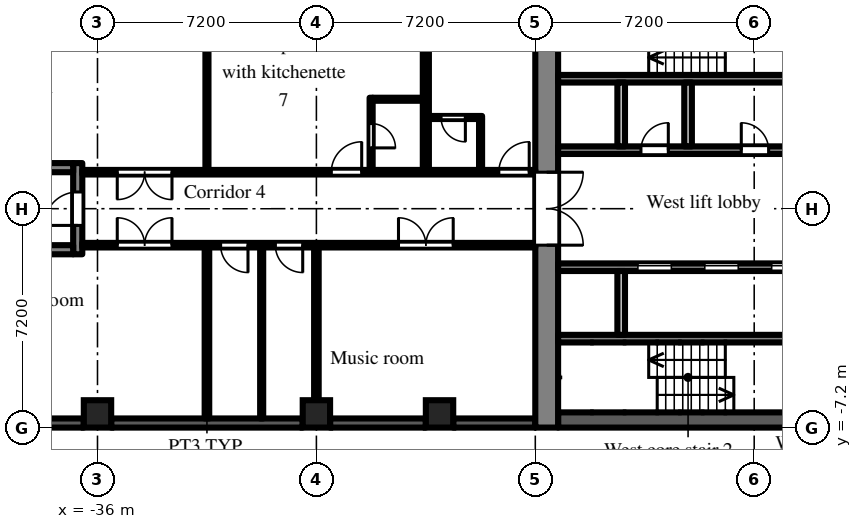
"""IFC4 building model, lengths in metres.
Left out: names, types, materials, properties, quantities, classifications, styles, units other than length and angle.
Written with IfcOpenShell. Run it as: python <this file> out.ifc"""

import sys

from ifc_helpers import new_model, si_unit, direction, frame, frame_2d, origin, origin_2d, place, context, subcontext, project, spatial, rectangle, extrude, element, fill, save


model = new_model("IFC4")
c1 = context("Model", 3, precision=1e-05, world=origin(), true_north=direction((0.0, 1.0)))
c2 = subcontext(c1, "Body", "Model", "MODEL_VIEW")
j1 = project(units=[si_unit("LENGTHUNIT", "METRE"), si_unit("PLANEANGLEUNIT", "RADIAN")], contexts=[c1])
p1 = place(None, origin())
s1 = spatial("IfcSite", under=j1, at=p1, CompositionType="ELEMENT")
p2 = place(p1, origin())
s2 = spatial("IfcBuilding", under=s1, at=p2, CompositionType="ELEMENT")
p3 = place(p2, frame((0.0, 0.0, 59.7)))
s3 = spatial("IfcBuildingStorey", under=s2, at=p3, CompositionType="ELEMENT", Elevation=59.7)
for number, where, z_axis, x_axis in (
    (1, (-36.0, -6.75, 0.0), (0.0, 0.0, 1.0), (1.0, 0.0, 0.0)),
    (2, (-28.8, -6.75, 0.0), (0.0, 0.0, 1.0), (1.0, 0.0, 0.0)),
    (3, (-24.75, -6.75, 0.0), (0.0, 0.0, 1.0), (1.0, 0.0, 0.0)),
):
    element("IfcColumn", number, at=place(p3, frame(where, z_axis=z_axis, x_axis=x_axis)), inside=s3, PredefinedType="COLUMN", context=c2, shape_type="SweptSolid", body=[
        extrude(rectangle(XDim=0.9, YDim=0.9, at=origin_2d()), origin(), (0.0, 0.0, 1.0), 3.0),
    ])
p4 = place(p3, frame((-38.7, -7.05, 0.0), z_axis=(0.0, 0.0, 1.0), x_axis=(1.0, 0.0, 0.0)))
e4 = element("IfcWall", 4, at=p4, inside=s3, PredefinedType="SOLIDWALL", context=c2, shape_type="SweptSolid", body=[
    extrude(rectangle(XDim=2.25, YDim=0.3, at=frame_2d((1.125, 0.0))), origin(), (0.0, 0.0, 1.0), 2.1),
])
p5 = place(p3, frame((-35.55, -7.05, 0.0), z_axis=(0.0, 0.0, 1.0), x_axis=(1.0, 0.0, 0.0)))
e5 = element("IfcWall", 5, at=p5, inside=s3, PredefinedType="SOLIDWALL", context=c2, shape_type="SweptSolid", body=[
    extrude(rectangle(XDim=6.3, YDim=0.3, at=frame_2d((3.15, 0.0))), origin(), (0.0, 0.0, 1.0), 2.1),
])
p6 = place(p3, frame((-28.35, -7.05, 0.0), z_axis=(0.0, 0.0, 1.0), x_axis=(1.0, 0.0, 0.0)))
e6 = element("IfcWall", 6, at=p6, inside=s3, PredefinedType="SOLIDWALL", context=c2, shape_type="SweptSolid", body=[
    extrude(rectangle(XDim=3.15, YDim=0.3, at=frame_2d((1.575, 0.0))), origin(), (0.0, 0.0, 1.0), 2.1),
])
p7 = place(p3, frame((-24.3, -7.05, 0.0), z_axis=(0.0, 0.0, 1.0), x_axis=(1.0, 0.0, 0.0)))
e7 = element("IfcWall", 7, at=p7, inside=s3, PredefinedType="SOLIDWALL", context=c2, shape_type="SweptSolid", body=[
    extrude(rectangle(XDim=2.7, YDim=0.3, at=frame_2d((1.35, 0.0))), origin(), (0.0, 0.0, 1.0), 2.1),
])
p8 = place(p3, frame((-21.225, -7.2, 0.0), z_axis=(0.0, 0.0, 1.0), x_axis=(0.0, 1.0, 0.0)))
e8 = element("IfcWall", 8, at=p8, inside=s3, PredefinedType="SHEAR", context=c2, shape_type="SweptSolid", body=[
    extrude(rectangle(XDim=14.4, YDim=0.75, at=frame_2d((7.2, 0.0))), origin(), (0.0, 0.0, 1.0), 2.55),
])
p9 = place(p8, frame((6.0, 0.0, 0.0)))
e9 = element("IfcOpeningElement", 9, at=p9, cuts=e8, PredefinedType="OPENING", context=c2, shape_type="SweptSolid", body=[
    extrude(rectangle(XDim=2.4, YDim=2.2, at=frame_2d((1.2, 1.1))), frame((0.0, 0.385, 0.0), z_axis=(0.0, -1.0, 0.0), x_axis=(1.0, 0.0, 0.0)), (0.0, 0.0, 1.0), 0.77),
])
p10 = place(p3, frame((-7.9, 1.925, 0.0), z_axis=(0.0, 0.0, 1.0), x_axis=(-1.0, 0.0, 0.0)))
e10 = element("IfcWall", 10, at=p10, inside=s3, PredefinedType="SHEAR", context=c2, shape_type="SweptSolid", body=[
    extrude(rectangle(XDim=12.95, YDim=0.25, at=frame_2d((6.475, 0.0))), origin(), (0.0, 0.0, 1.0), 2.55),
])
p11 = place(p10, frame((0.525, 0.0, 0.0)))
e11 = element("IfcOpeningElement", 11, at=p11, cuts=e10, PredefinedType="OPENING", context=c2, shape_type="SweptSolid", body=[
    extrude(rectangle(XDim=0.9, YDim=2.1, at=frame_2d((0.45, 1.05))), frame((0.0, 0.135, 0.0), z_axis=(0.0, -1.0, 0.0), x_axis=(1.0, 0.0, 0.0)), (0.0, 0.0, 1.0), 0.27),
])
p12 = place(p10, frame((2.625, 0.0, 0.0)))
e12 = element("IfcOpeningElement", 12, at=p12, cuts=e10, PredefinedType="OPENING", context=c2, shape_type="SweptSolid", body=[
    extrude(rectangle(XDim=1.1, YDim=2.1, at=frame_2d((0.55, 1.05))), frame((0.0, 0.135, 0.0), z_axis=(0.0, -1.0, 0.0), x_axis=(1.0, 0.0, 0.0)), (0.0, 0.0, 1.0), 0.27),
])
p13 = place(p10, frame((6.025, 0.0, 0.0)))
e13 = element("IfcOpeningElement", 13, at=p13, cuts=e10, PredefinedType="OPENING", context=c2, shape_type="SweptSolid", body=[
    extrude(rectangle(XDim=0.9, YDim=2.1, at=frame_2d((0.45, 1.05))), frame((0.0, 0.135, 0.0), z_axis=(0.0, -1.0, 0.0), x_axis=(1.0, 0.0, 0.0)), (0.0, 0.0, 1.0), 0.27),
])
p14 = place(p10, frame((9.325, 0.0, 0.0)))
e14 = element("IfcOpeningElement", 14, at=p14, cuts=e10, PredefinedType="OPENING", context=c2, shape_type="SweptSolid", body=[
    extrude(rectangle(XDim=0.9, YDim=2.1, at=frame_2d((0.45, 1.05))), frame((0.0, 0.135, 0.0), z_axis=(0.0, -1.0, 0.0), x_axis=(1.0, 0.0, 0.0)), (0.0, 0.0, 1.0), 0.27),
])
p15 = place(p3, frame((-12.3, 4.275, 0.0), z_axis=(0.0, 0.0, 1.0), x_axis=(-1.0, 0.0, 0.0)))
e15 = element("IfcWall", 15, at=p15, inside=s3, PredefinedType="SHEAR", context=c2, shape_type="SweptSolid", body=[
    extrude(rectangle(XDim=8.55, YDim=0.25, at=frame_2d((4.275, 0.0))), origin(), (0.0, 0.0, 1.0), 2.55),
])
for number, where, z_axis, x_axis in (
    (16, (-16.575, 2.05, 0.0), (0.0, 0.0, 1.0), (0.0, 1.0, 0.0)),
    (17, (-18.775, 2.05, 0.0), (0.0, 0.0, 1.0), (0.0, 1.0, 0.0)),
):
    element("IfcWall", number, at=place(p3, frame(where, z_axis=z_axis, x_axis=x_axis)), inside=s3, PredefinedType="PARTITIONING", context=c2, shape_type="SweptSolid", body=[
        extrude(rectangle(XDim=2.1, YDim=0.25, at=frame_2d((1.05, 0.0))), origin(), (0.0, 0.0, 1.0), 2.55),
    ])
p16 = place(p3, frame((-7.9, -6.95, 0.0), z_axis=(0.0, 0.0, 1.0), x_axis=(-1.0, 0.0, 0.0)))
e18 = element("IfcWall", 18, at=p16, inside=s3, PredefinedType="SHEAR", context=c2, shape_type="SweptSolid", body=[
    extrude(rectangle(XDim=12.95, YDim=0.5, at=frame_2d((6.475, 0.0))), origin(), (0.0, 0.0, 1.0), 2.55),
])
p17 = place(p3, frame((-7.9, -1.925, 0.0), z_axis=(0.0, 0.0, 1.0), x_axis=(-1.0, 0.0, 0.0)))
e19 = element("IfcWall", 19, at=p17, inside=s3, PredefinedType="SHEAR", context=c2, shape_type="SweptSolid", body=[
    extrude(rectangle(XDim=12.95, YDim=0.25, at=frame_2d((6.475, 0.0))), origin(), (0.0, 0.0, 1.0), 2.55),
])
p18 = place(p17, frame((4.825, 0.0, 0.0)))
e20 = element("IfcOpeningElement", 20, at=p18, cuts=e19, PredefinedType="OPENING", context=c2, shape_type="SweptSolid", body=[
    extrude(rectangle(XDim=1.1, YDim=2.1, at=frame_2d((0.55, 1.05))), frame((0.0, 0.135, 0.0), z_axis=(0.0, -1.0, 0.0), x_axis=(1.0, 0.0, 0.0)), (0.0, 0.0, 1.0), 0.27),
])
p19 = place(p17, frame((7.025, 0.0, 0.0)))
e21 = element("IfcOpeningElement", 21, at=p19, cuts=e19, PredefinedType="OPENING", context=c2, shape_type="SweptSolid", body=[
    extrude(rectangle(XDim=1.1, YDim=2.1, at=frame_2d((0.55, 1.05))), frame((0.0, 0.135, 0.0), z_axis=(0.0, -1.0, 0.0), x_axis=(1.0, 0.0, 0.0)), (0.0, 0.0, 1.0), 0.27),
])
p20 = place(p17, frame((9.225, 0.0, 0.0)))
e22 = element("IfcOpeningElement", 22, at=p20, cuts=e19, PredefinedType="OPENING", context=c2, shape_type="SweptSolid", body=[
    extrude(rectangle(XDim=1.1, YDim=2.1, at=frame_2d((0.55, 1.05))), frame((0.0, 0.135, 0.0), z_axis=(0.0, -1.0, 0.0), x_axis=(1.0, 0.0, 0.0)), (0.0, 0.0, 1.0), 0.27),
])
p21 = place(p17, frame((0.525, 0.0, 0.0)))
e23 = element("IfcOpeningElement", 23, at=p21, cuts=e19, PredefinedType="OPENING", context=c2, shape_type="SweptSolid", body=[
    extrude(rectangle(XDim=0.9, YDim=2.1, at=frame_2d((0.45, 1.05))), frame((0.0, 0.135, 0.0), z_axis=(0.0, -1.0, 0.0), x_axis=(1.0, 0.0, 0.0)), (0.0, 0.0, 1.0), 0.27),
])
p22 = place(p17, frame((2.625, 0.0, 0.0)))
e24 = element("IfcOpeningElement", 24, at=p22, cuts=e19, PredefinedType="OPENING", context=c2, shape_type="SweptSolid", body=[
    extrude(rectangle(XDim=1.1, YDim=2.1, at=frame_2d((0.55, 1.05))), frame((0.0, 0.135, 0.0), z_axis=(0.0, -1.0, 0.0), x_axis=(1.0, 0.0, 0.0)), (0.0, 0.0, 1.0), 0.27),
])
p23 = place(p3, frame((-12.3, -4.275, 0.0), z_axis=(0.0, 0.0, 1.0), x_axis=(-1.0, 0.0, 0.0)))
e25 = element("IfcWall", 25, at=p23, inside=s3, PredefinedType="SHEAR", context=c2, shape_type="SweptSolid", body=[
    extrude(rectangle(XDim=8.55, YDim=0.25, at=frame_2d((4.275, 0.0))), origin(), (0.0, 0.0, 1.0), 2.55),
])
p24 = place(p3, frame((-18.775, -2.05, 0.0), z_axis=(0.0, 0.0, 1.0), x_axis=(0.0, -1.0, 0.0)))
e26 = element("IfcWall", 26, at=p24, inside=s3, PredefinedType="PARTITIONING", context=c2, shape_type="SweptSolid", body=[
    extrude(rectangle(XDim=2.1, YDim=0.25, at=frame_2d((1.05, 0.0))), origin(), (0.0, 0.0, 1.0), 2.55),
])
p25 = place(p3, frame((-36.65, -1.5, 0.0), z_axis=(0.0, 0.0, 1.0), x_axis=(0.0, 1.0, 0.0)))
e27 = element("IfcWall", 27, at=p25, inside=s3, PredefinedType="SHEAR", context=c2, shape_type="SweptSolid", body=[
    extrude(rectangle(XDim=3.0, YDim=0.3, at=frame_2d((1.5, 0.0))), origin(), (0.0, 0.0, 1.0), 2.55),
])
p26 = place(p25, frame((0.95, 0.0, 0.0)))
e28 = element("IfcOpeningElement", 28, at=p26, cuts=e27, PredefinedType="OPENING", context=c2, shape_type="SweptSolid", body=[
    extrude(rectangle(XDim=1.1, YDim=2.1, at=frame_2d((0.55, 1.05))), frame((0.0, 0.16, 0.0), z_axis=(0.0, -1.0, 0.0), x_axis=(1.0, 0.0, 0.0)), (0.0, 0.0, 1.0), 0.32),
])
for number, where, z_axis, x_axis in (
    (29, (-36.8, -1.35, 0.0), (0.0, 0.0, 1.0), (-1.0, 0.0, 0.0)),
    (30, (-36.8, 1.35, 0.0), (0.0, 0.0, 1.0), (-1.0, 0.0, 0.0)),
):
    element("IfcWall", number, at=place(p3, frame(where, z_axis=z_axis, x_axis=x_axis)), inside=s3, PredefinedType="SHEAR", context=c2, shape_type="SweptSolid", body=[
        extrude(rectangle(XDim=5.8, YDim=0.3, at=frame_2d((2.9, 0.0))), origin(), (0.0, 0.0, 1.0), 2.55),
    ])
p27 = place(p3, frame((-36.5, -1.2, 0.0), z_axis=(0.0, 0.0, 1.0), x_axis=(1.0, 0.0, 0.0)))
e31 = element("IfcWall", 31, at=p27, inside=s3, PredefinedType="PARTITIONING", context=c2, shape_type="SweptSolid", body=[
    extrude(rectangle(XDim=14.9, YDim=0.15, at=frame_2d((7.45, 0.0))), origin(), (0.0, 0.0, 1.0), 2.55),
])
p28 = place(p27, frame((10.4, 0.0, 0.0)))
e32 = element("IfcOpeningElement", 32, at=p28, cuts=e31, PredefinedType="OPENING", context=c2, shape_type="SweptSolid", body=[
    extrude(rectangle(XDim=1.8, YDim=2.1, at=frame_2d((0.9, 1.05))), frame((0.0, 0.085, 0.0), z_axis=(0.0, -1.0, 0.0), x_axis=(1.0, 0.0, 0.0)), (0.0, 0.0, 1.0), 0.17),
])
p29 = place(p27, frame((6.35, 0.0, 0.0)))
e33 = element("IfcOpeningElement", 33, at=p29, cuts=e31, PredefinedType="OPENING", context=c2, shape_type="SweptSolid", body=[
    extrude(rectangle(XDim=0.9, YDim=2.1, at=frame_2d((0.45, 1.05))), frame((0.0, 0.085, 0.0), z_axis=(0.0, -1.0, 0.0), x_axis=(1.0, 0.0, 0.0)), (0.0, 0.0, 1.0), 0.17),
])
p30 = place(p27, frame((4.55, 0.0, 0.0)))
e34 = element("IfcOpeningElement", 34, at=p30, cuts=e31, PredefinedType="OPENING", context=c2, shape_type="SweptSolid", body=[
    extrude(rectangle(XDim=0.9, YDim=2.1, at=frame_2d((0.45, 1.05))), frame((0.0, 0.085, 0.0), z_axis=(0.0, -1.0, 0.0), x_axis=(1.0, 0.0, 0.0)), (0.0, 0.0, 1.0), 0.17),
])
p31 = place(p27, frame((1.15, 0.0, 0.0)))
e35 = element("IfcOpeningElement", 35, at=p31, cuts=e31, PredefinedType="OPENING", context=c2, shape_type="SweptSolid", body=[
    extrude(rectangle(XDim=1.8, YDim=2.1, at=frame_2d((0.9, 1.05))), frame((0.0, 0.085, 0.0), z_axis=(0.0, -1.0, 0.0), x_axis=(1.0, 0.0, 0.0)), (0.0, 0.0, 1.0), 0.17),
])
p32 = place(p3, frame((-36.5, 1.2, 0.0), z_axis=(0.0, 0.0, 1.0), x_axis=(1.0, 0.0, 0.0)))
e36 = element("IfcWall", 36, at=p32, inside=s3, PredefinedType="PARTITIONING", context=c2, shape_type="SweptSolid", body=[
    extrude(rectangle(XDim=14.9, YDim=0.15, at=frame_2d((7.45, 0.0))), origin(), (0.0, 0.0, 1.0), 2.55),
])
p33 = place(p32, frame((13.7, 0.0, 0.0)))
e37 = element("IfcOpeningElement", 37, at=p33, cuts=e36, PredefinedType="OPENING", context=c2, shape_type="SweptSolid", body=[
    extrude(rectangle(XDim=1.0, YDim=2.1, at=frame_2d((0.5, 1.05))), frame((0.0, 0.085, 0.0), z_axis=(0.0, -1.0, 0.0), x_axis=(1.0, 0.0, 0.0)), (0.0, 0.0, 1.0), 0.17),
])
p34 = place(p32, frame((8.19, 0.0, 0.0)))
e38 = element("IfcOpeningElement", 38, at=p34, cuts=e36, PredefinedType="OPENING", context=c2, shape_type="SweptSolid", body=[
    extrude(rectangle(XDim=1.0, YDim=2.1, at=frame_2d((0.5, 1.05))), frame((0.0, 0.085, 0.0), z_axis=(0.0, -1.0, 0.0), x_axis=(1.0, 0.0, 0.0)), (0.0, 0.0, 1.0), 0.17),
])
p35 = place(p32, frame((1.15, 0.0, 0.0)))
e39 = element("IfcOpeningElement", 39, at=p35, cuts=e36, PredefinedType="OPENING", context=c2, shape_type="SweptSolid", body=[
    extrude(rectangle(XDim=1.8, YDim=2.1, at=frame_2d((0.9, 1.05))), frame((0.0, 0.085, 0.0), z_axis=(0.0, -1.0, 0.0), x_axis=(1.0, 0.0, 0.0)), (0.0, 0.0, 1.0), 0.17),
])
p36 = place(p3, frame((-32.4, -6.9, 0.0), z_axis=(0.0, 0.0, 1.0), x_axis=(0.0, 1.0, 0.0)))
e40 = element("IfcWall", 40, at=p36, inside=s3, PredefinedType="PARTITIONING", context=c2, shape_type="SweptSolid", body=[
    extrude(rectangle(XDim=5.625, YDim=0.15, at=frame_2d((2.812, 0.0))), origin(), (0.0, 0.0, 1.0), 2.55),
])
for number, where, z_axis, x_axis in (
    (41, (-32.4, 1.275, 0.0), (0.0, 0.0, 1.0), (0.0, 1.0, 0.0)),
    (42, (-30.6, -6.9, 0.0), (0.0, 0.0, 1.0), (0.0, 1.0, 0.0)),
):
    element("IfcWall", number, at=place(p3, frame(where, z_axis=z_axis, x_axis=x_axis)), inside=s3, PredefinedType="PARTITIONING", context=c2, shape_type="SweptSolid", body=[
        extrude(rectangle(XDim=5.625, YDim=0.1, at=frame_2d((2.812, 0.0))), origin(), (0.0, 0.0, 1.0), 2.55),
    ])
p37 = place(p3, frame((-28.8, -6.9, 0.0), z_axis=(0.0, 0.0, 1.0), x_axis=(0.0, 1.0, 0.0)))
e43 = element("IfcWall", 43, at=p37, inside=s3, PredefinedType="PARTITIONING", context=c2, shape_type="SweptSolid", body=[
    extrude(rectangle(XDim=5.625, YDim=0.15, at=frame_2d((2.812, 0.0))), origin(), (0.0, 0.0, 1.0), 2.55),
])
p38 = place(p3, frame((-27.0, 1.275, 0.0), z_axis=(0.0, 0.0, 1.0), x_axis=(0.0, 1.0, 0.0)))
e44 = element("IfcWall", 44, at=p38, inside=s3, PredefinedType="PARTITIONING", context=c2, shape_type="SweptSolid", body=[
    extrude(rectangle(XDim=2.375, YDim=0.1, at=frame_2d((1.188, 0.0))), origin(), (0.0, 0.0, 1.0), 2.55),
])
p39 = place(p38, frame((0.725, 0.0, 0.0)))
e45 = element("IfcOpeningElement", 45, at=p39, cuts=e44, PredefinedType="OPENING", context=c2, shape_type="SweptSolid", body=[
    extrude(rectangle(XDim=0.8, YDim=2.1, at=frame_2d((0.4, 1.05))), frame((0.0, 0.06, 0.0), z_axis=(0.0, -1.0, 0.0), x_axis=(1.0, 0.0, 0.0)), (0.0, 0.0, 1.0), 0.12),
])
p40 = place(p3, frame((-26.95, 3.6, 0.0), z_axis=(0.0, 0.0, 1.0), x_axis=(1.0, 0.0, 0.0)))
e46 = element("IfcWall", 46, at=p40, inside=s3, PredefinedType="PARTITIONING", context=c2, shape_type="SweptSolid", body=[
    extrude(rectangle(XDim=1.65, YDim=0.1, at=frame_2d((0.825, 0.0))), origin(), (0.0, 0.0, 1.0), 2.55),
])
p41 = place(p3, frame((-25.2, 1.275, 0.0), z_axis=(0.0, 0.0, 1.0), x_axis=(0.0, 1.0, 0.0)))
e47 = element("IfcWall", 47, at=p41, inside=s3, PredefinedType="PARTITIONING", context=c2, shape_type="SweptSolid", body=[
    extrude(rectangle(XDim=5.625, YDim=0.2, at=frame_2d((2.812, 0.0))), origin(), (0.0, 0.0, 1.0), 2.55),
])
p42 = place(p3, frame((-25.1, 3.0, 0.0), z_axis=(0.0, 0.0, 1.0), x_axis=(1.0, 0.0, 0.0)))
e48 = element("IfcWall", 48, at=p42, inside=s3, PredefinedType="PARTITIONING", context=c2, shape_type="SweptSolid", body=[
    extrude(rectangle(XDim=1.75, YDim=0.1, at=frame_2d((0.875, 0.0))), origin(), (0.0, 0.0, 1.0), 2.55),
])
p43 = place(p42, frame((0.4, 0.0, 0.0)))
e49 = element("IfcOpeningElement", 49, at=p43, cuts=e48, PredefinedType="OPENING", context=c2, shape_type="SweptSolid", body=[
    extrude(rectangle(XDim=0.8, YDim=2.1, at=frame_2d((0.4, 1.05))), frame((0.0, 0.06, 0.0), z_axis=(0.0, -1.0, 0.0), x_axis=(1.0, 0.0, 0.0)), (0.0, 0.0, 1.0), 0.12),
])
p44 = place(p3, frame((-23.4, 1.275, 0.0), z_axis=(0.0, 0.0, 1.0), x_axis=(0.0, 1.0, 0.0)))
e50 = element("IfcWall", 50, at=p44, inside=s3, PredefinedType="PARTITIONING", context=c2, shape_type="SweptSolid", body=[
    extrude(rectangle(XDim=1.675, YDim=0.1, at=frame_2d((0.837, 0.0))), origin(), (0.0, 0.0, 1.0), 2.55),
])
p45 = place(p18, origin())
e51 = element("IfcDoor", 51, at=p45, inside=s3, OperationType="SLIDING_TO_LEFT", PredefinedType="DOOR", context=c2, shape_type="SweptSolid", body=[
    extrude(rectangle(XDim=1.1, YDim=2.1, at=frame_2d((0.55, 1.05))), frame((0.0, 0.025, 0.0), z_axis=(0.0, -1.0, 0.0), x_axis=(1.0, 0.0, 0.0)), (0.0, 0.0, 1.0), 0.05),
])
fill(e20, e51)
p46 = place(p19, origin())
e52 = element("IfcDoor", 52, at=p46, inside=s3, OperationType="SLIDING_TO_LEFT", PredefinedType="DOOR", context=c2, shape_type="SweptSolid", body=[
    extrude(rectangle(XDim=1.1, YDim=2.1, at=frame_2d((0.55, 1.05))), frame((0.0, 0.025, 0.0), z_axis=(0.0, -1.0, 0.0), x_axis=(1.0, 0.0, 0.0)), (0.0, 0.0, 1.0), 0.05),
])
fill(e21, e52)
p47 = place(p20, origin())
e53 = element("IfcDoor", 53, at=p47, inside=s3, OperationType="SLIDING_TO_LEFT", PredefinedType="DOOR", context=c2, shape_type="SweptSolid", body=[
    extrude(rectangle(XDim=1.1, YDim=2.1, at=frame_2d((0.55, 1.05))), frame((0.0, 0.025, 0.0), z_axis=(0.0, -1.0, 0.0), x_axis=(1.0, 0.0, 0.0)), (0.0, 0.0, 1.0), 0.05),
])
fill(e22, e53)
p48 = place(p9, frame((2.4, 0.0, 0.0), z_axis=(0.0, 0.0, 1.0), x_axis=(-1.0, 0.0, 0.0)))
e54 = element("IfcDoor", 54, at=p48, inside=s3, OperationType="DOUBLE_DOOR_DOUBLE_SWING", PredefinedType="DOOR", context=c2, shape_type="SweptSolid", body=[
    extrude(rectangle(XDim=2.4, YDim=2.2, at=frame_2d((1.2, 1.1))), frame((0.0, 0.025, 0.0), z_axis=(0.0, -1.0, 0.0), x_axis=(1.0, 0.0, 0.0)), (0.0, 0.0, 1.0), 0.05),
])
fill(e9, e54)
p49 = place(p13, frame((0.9, 0.0, 0.0), z_axis=(0.0, 0.0, 1.0), x_axis=(-1.0, 0.0, 0.0)))
e55 = element("IfcDoor", 55, at=p49, inside=s3, OperationType="SINGLE_SWING_LEFT", PredefinedType="DOOR", context=c2, shape_type="SweptSolid", body=[
    extrude(rectangle(XDim=0.9, YDim=2.1, at=frame_2d((0.45, 1.05))), frame((0.0, 0.025, 0.0), z_axis=(0.0, -1.0, 0.0), x_axis=(1.0, 0.0, 0.0)), (0.0, 0.0, 1.0), 0.05),
])
fill(e13, e55)
p50 = place(p14, frame((0.9, 0.0, 0.0), z_axis=(0.0, 0.0, 1.0), x_axis=(-1.0, 0.0, 0.0)))
e56 = element("IfcDoor", 56, at=p50, inside=s3, OperationType="SINGLE_SWING_RIGHT", PredefinedType="DOOR", context=c2, shape_type="SweptSolid", body=[
    extrude(rectangle(XDim=0.9, YDim=2.1, at=frame_2d((0.45, 1.05))), frame((0.0, 0.025, 0.0), z_axis=(0.0, -1.0, 0.0), x_axis=(1.0, 0.0, 0.0)), (0.0, 0.0, 1.0), 0.05),
])
fill(e14, e56)
p51 = place(p26, origin())
e57 = element("IfcDoor", 57, at=p51, inside=s3, OperationType="SINGLE_SWING_LEFT", PredefinedType="DOOR", context=c2, shape_type="SweptSolid", body=[
    extrude(rectangle(XDim=1.1, YDim=2.1, at=frame_2d((0.55, 1.05))), frame((0.0, 0.025, 0.0), z_axis=(0.0, -1.0, 0.0), x_axis=(1.0, 0.0, 0.0)), (0.0, 0.0, 1.0), 0.05),
])
fill(e28, e57)
p52 = place(p28, origin())
e58 = element("IfcDoor", 58, at=p52, inside=s3, OperationType="DOUBLE_DOOR_DOUBLE_SWING", PredefinedType="DOOR", context=c2, shape_type="SweptSolid", body=[
    extrude(rectangle(XDim=1.8, YDim=2.1, at=frame_2d((0.9, 1.05))), frame((0.0, 0.025, 0.0), z_axis=(0.0, -1.0, 0.0), x_axis=(1.0, 0.0, 0.0)), (0.0, 0.0, 1.0), 0.05),
])
fill(e32, e58)
p53 = place(p29, frame((0.9, 0.0, 0.0), z_axis=(0.0, 0.0, 1.0), x_axis=(-1.0, 0.0, 0.0)))
e59 = element("IfcDoor", 59, at=p53, inside=s3, OperationType="SINGLE_SWING_LEFT", PredefinedType="DOOR", context=c2, shape_type="SweptSolid", body=[
    extrude(rectangle(XDim=0.9, YDim=2.1, at=frame_2d((0.45, 1.05))), frame((0.0, 0.025, 0.0), z_axis=(0.0, -1.0, 0.0), x_axis=(1.0, 0.0, 0.0)), (0.0, 0.0, 1.0), 0.05),
])
fill(e33, e59)
p54 = place(p30, frame((0.9, 0.0, 0.0), z_axis=(0.0, 0.0, 1.0), x_axis=(-1.0, 0.0, 0.0)))
e60 = element("IfcDoor", 60, at=p54, inside=s3, OperationType="SINGLE_SWING_LEFT", PredefinedType="DOOR", context=c2, shape_type="SweptSolid", body=[
    extrude(rectangle(XDim=0.9, YDim=2.1, at=frame_2d((0.45, 1.05))), frame((0.0, 0.025, 0.0), z_axis=(0.0, -1.0, 0.0), x_axis=(1.0, 0.0, 0.0)), (0.0, 0.0, 1.0), 0.05),
])
fill(e34, e60)
p55 = place(p31, origin())
e61 = element("IfcDoor", 61, at=p55, inside=s3, OperationType="DOUBLE_DOOR_DOUBLE_SWING", PredefinedType="DOOR", context=c2, shape_type="SweptSolid", body=[
    extrude(rectangle(XDim=1.8, YDim=2.1, at=frame_2d((0.9, 1.05))), frame((0.0, 0.025, 0.0), z_axis=(0.0, -1.0, 0.0), x_axis=(1.0, 0.0, 0.0)), (0.0, 0.0, 1.0), 0.05),
])
fill(e35, e61)
p56 = place(p43, frame((0.8, 0.0, 0.0), z_axis=(0.0, 0.0, 1.0), x_axis=(-1.0, 0.0, 0.0)))
e62 = element("IfcDoor", 62, at=p56, inside=s3, OperationType="SINGLE_SWING_LEFT", PredefinedType="DOOR", context=c2, shape_type="SweptSolid", body=[
    extrude(rectangle(XDim=0.8, YDim=2.1, at=frame_2d((0.4, 1.05))), frame((0.0, 0.025, 0.0), z_axis=(0.0, -1.0, 0.0), x_axis=(1.0, 0.0, 0.0)), (0.0, 0.0, 1.0), 0.05),
])
fill(e49, e62)
p57 = place(p33, origin())
e63 = element("IfcDoor", 63, at=p57, inside=s3, OperationType="SINGLE_SWING_RIGHT", PredefinedType="DOOR", context=c2, shape_type="SweptSolid", body=[
    extrude(rectangle(XDim=1.0, YDim=2.1, at=frame_2d((0.5, 1.05))), frame((0.0, 0.025, 0.0), z_axis=(0.0, -1.0, 0.0), x_axis=(1.0, 0.0, 0.0)), (0.0, 0.0, 1.0), 0.05),
])
fill(e37, e63)
p58 = place(p39, frame((0.8, 0.0, 0.0), z_axis=(0.0, 0.0, 1.0), x_axis=(-1.0, 0.0, 0.0)))
e64 = element("IfcDoor", 64, at=p58, inside=s3, OperationType="SINGLE_SWING_RIGHT", PredefinedType="DOOR", context=c2, shape_type="SweptSolid", body=[
    extrude(rectangle(XDim=0.8, YDim=2.1, at=frame_2d((0.4, 1.05))), frame((0.0, 0.025, 0.0), z_axis=(0.0, -1.0, 0.0), x_axis=(1.0, 0.0, 0.0)), (0.0, 0.0, 1.0), 0.05),
])
fill(e45, e64)
p59 = place(p34, origin())
e65 = element("IfcDoor", 65, at=p59, inside=s3, OperationType="SINGLE_SWING_RIGHT", PredefinedType="DOOR", context=c2, shape_type="SweptSolid", body=[
    extrude(rectangle(XDim=1.0, YDim=2.1, at=frame_2d((0.5, 1.05))), frame((0.0, 0.025, 0.0), z_axis=(0.0, -1.0, 0.0), x_axis=(1.0, 0.0, 0.0)), (0.0, 0.0, 1.0), 0.05),
])
fill(e38, e65)
p60 = place(p35, frame((1.8, 0.0, 0.0), z_axis=(0.0, 0.0, 1.0), x_axis=(-1.0, 0.0, 0.0)))
e66 = element("IfcDoor", 66, at=p60, inside=s3, OperationType="DOUBLE_DOOR_DOUBLE_SWING", PredefinedType="DOOR", context=c2, shape_type="SweptSolid", body=[
    extrude(rectangle(XDim=1.8, YDim=2.1, at=frame_2d((0.9, 1.05))), frame((0.0, 0.025, 0.0), z_axis=(0.0, -1.0, 0.0), x_axis=(1.0, 0.0, 0.0)), (0.0, 0.0, 1.0), 0.05),
])
fill(e39, e66)
save(model, sys.argv[1])
